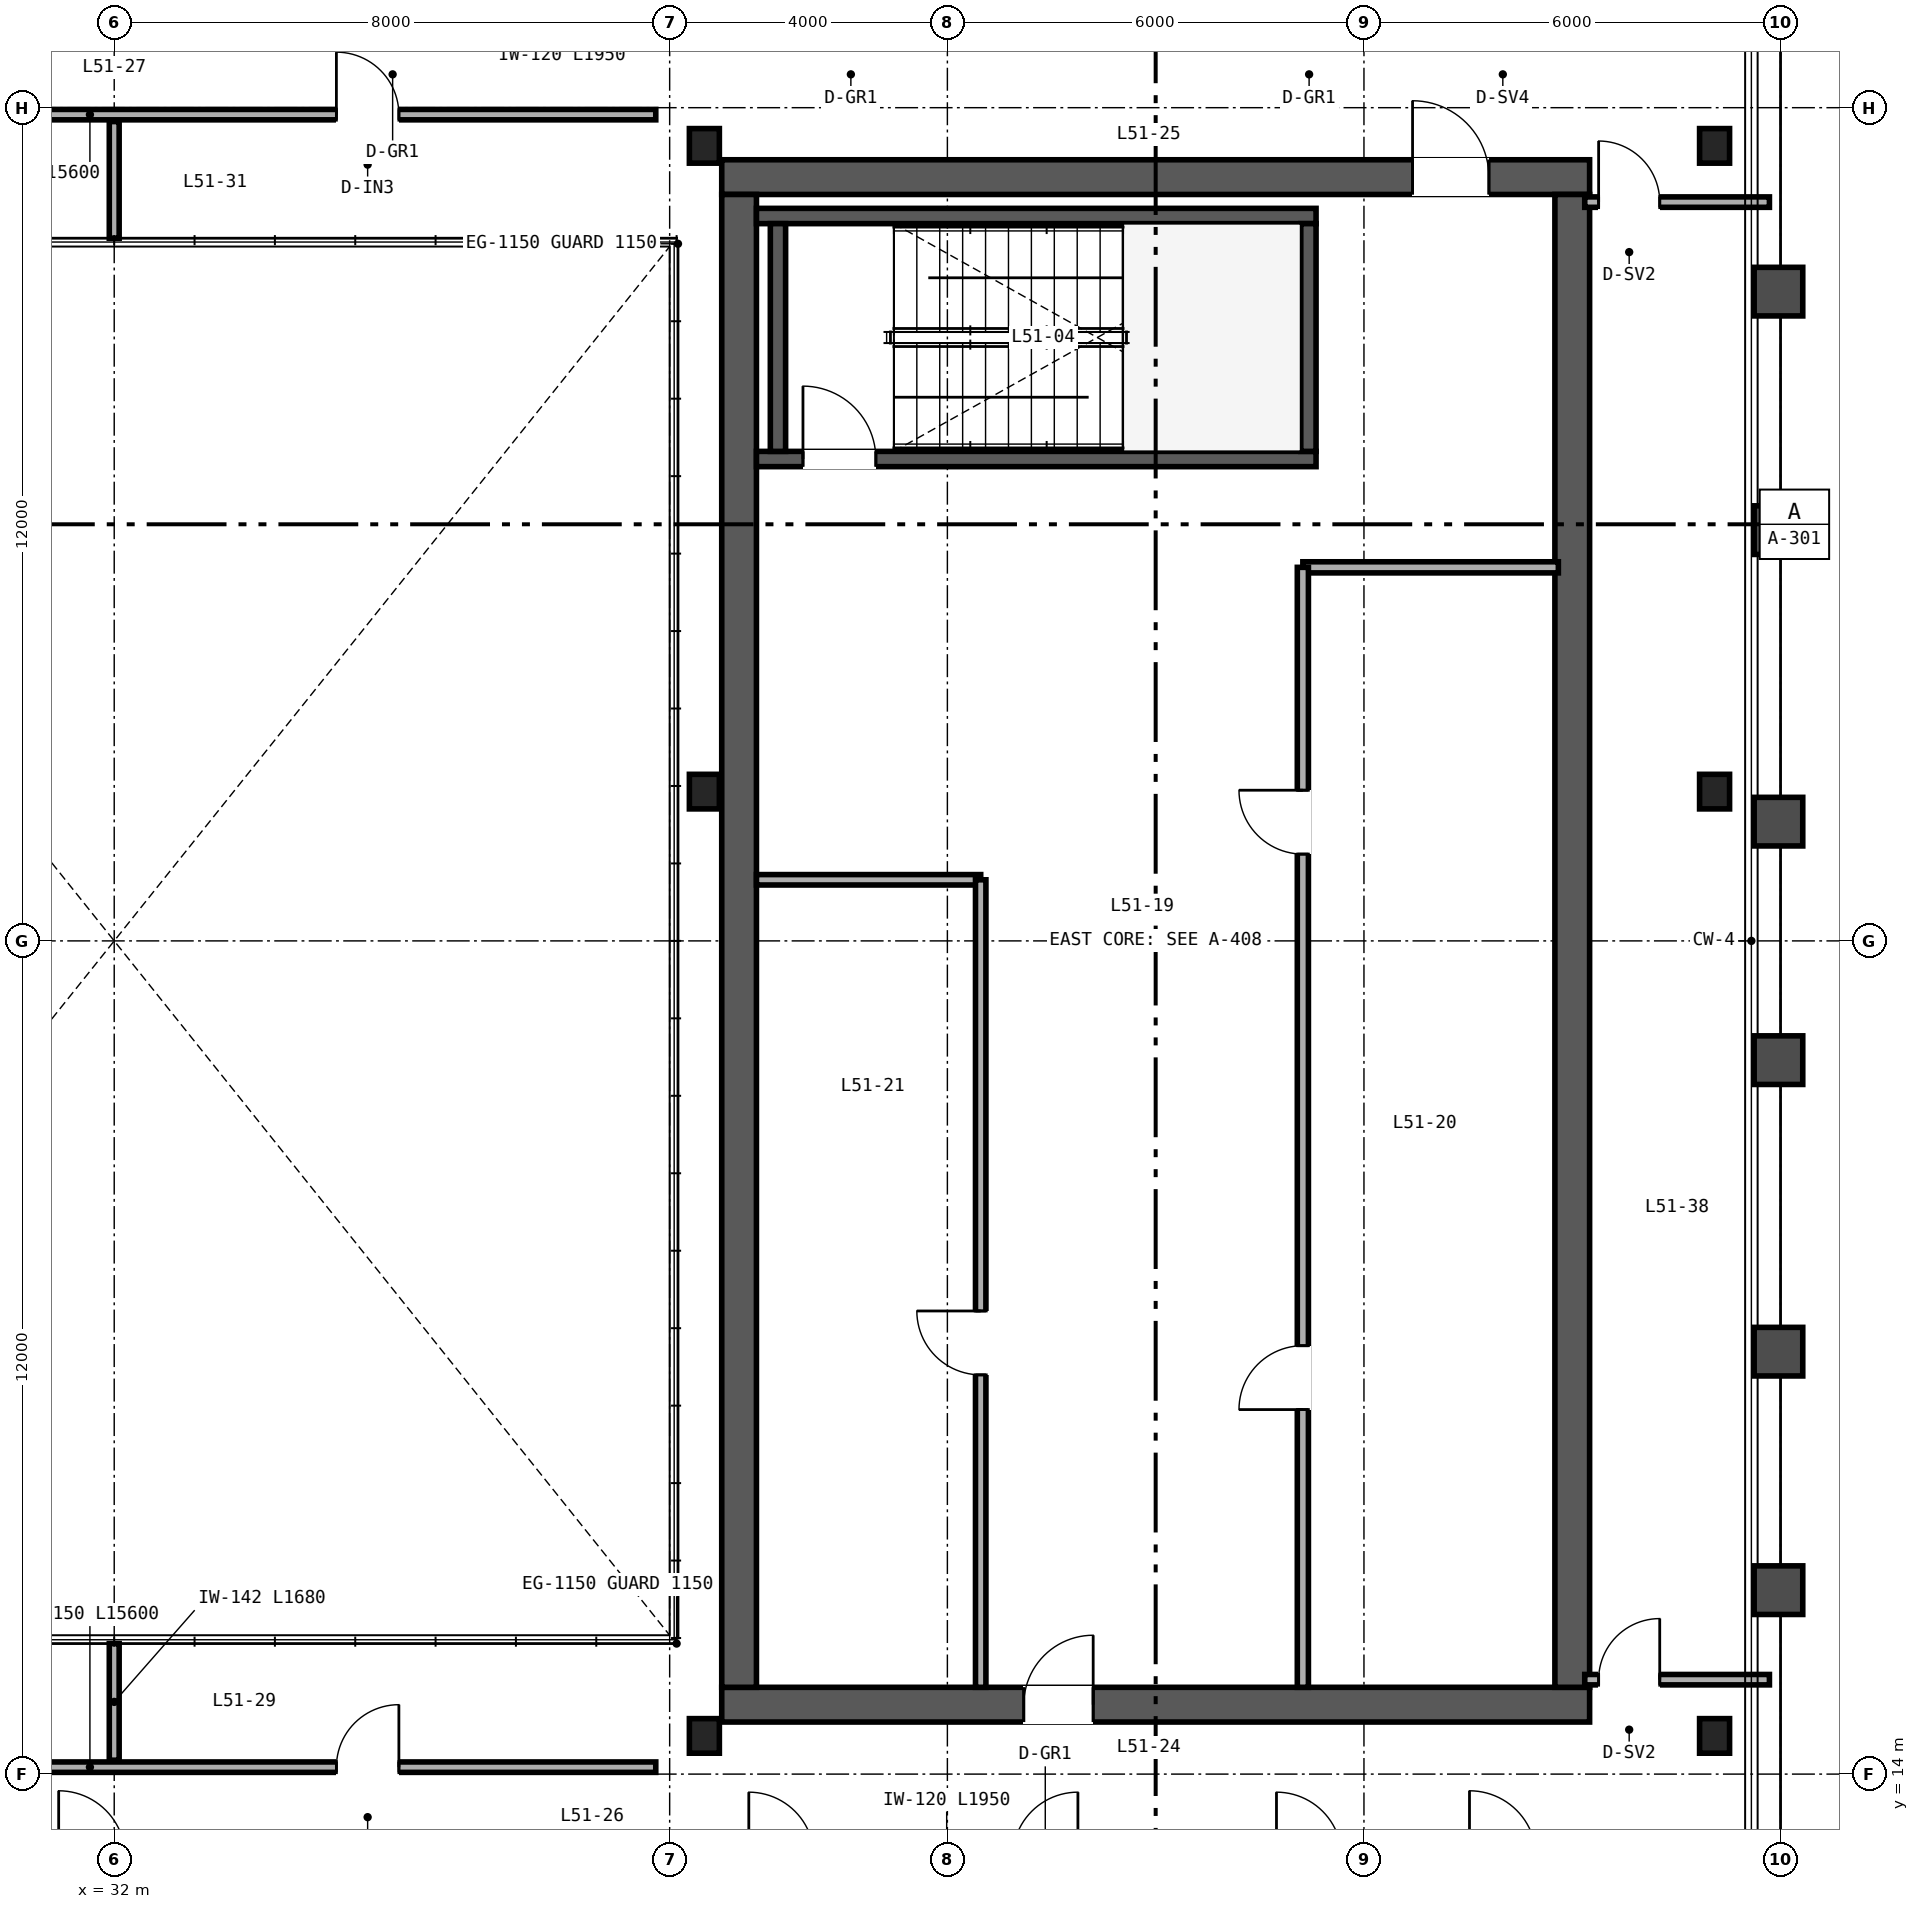
"""IFC4 building model, lengths in metres.
Left out: names, types, materials, properties, quantities, classifications, styles, units other than length and angle.
Written with IfcOpenShell. Run it as: python <this file> out.ifc"""

import sys

from ifc_helpers import new_model, si_unit, direction, frame, frame_2d, origin, origin_2d, place, context, subcontext, project, spatial, rectangle, i_section, extrude, source, transform, mapped, element, fill, save


model = new_model("IFC4")
c1 = context("Model", 3, precision=1e-05, world=origin(), true_north=direction((0.0, 1.0)))
c2 = subcontext(c1, "Body", "Model", "MODEL_VIEW")
j1 = project(units=[si_unit("LENGTHUNIT", "METRE"), si_unit("PLANEANGLEUNIT", "RADIAN")], contexts=[c1])
p1 = place(None, origin())
s1 = spatial("IfcSite", under=j1, at=p1, CompositionType="ELEMENT")
p2 = place(p1, origin())
s2 = spatial("IfcBuilding", under=s1, at=p2, CompositionType="ELEMENT")
p3 = place(p2, frame((0.0, 0.0, 202.8)))
s3 = spatial("IfcBuildingStorey", under=s2, at=p3, CompositionType="ELEMENT", Elevation=202.8)
p4 = place(p3, frame((40.75, 15.0, 0.0), z_axis=(0.0, 0.0, 1.0), x_axis=(1.0, 0.0, 0.0)))
e1 = element("IfcWall", 1, at=p4, inside=s3, PredefinedType="SHEAR", context=c2, shape_type="SweptSolid", body=[
    extrude(rectangle(XDim=12.5, YDim=0.5, at=frame_2d((6.25, 0.0))), origin(), (0.0, 0.0, 1.0), 3.37),
])
p5 = place(p4, frame((4.35, 0.0, 0.0)))
e2 = element("IfcOpeningElement", 2, at=p5, cuts=e1, PredefinedType="OPENING", context=c2, shape_type="SweptSolid", body=[
    extrude(rectangle(XDim=1.0, YDim=2.15, at=frame_2d((0.5, 1.075))), frame((0.0, 0.26, 0.0), z_axis=(0.0, -1.0, 0.0), x_axis=(1.0, 0.0, 0.0)), (0.0, 0.0, 1.0), 0.52),
])
p6 = place(p3, frame((40.75, 37.0, 0.0), z_axis=(0.0, 0.0, 1.0), x_axis=(1.0, 0.0, 0.0)))
e3 = element("IfcWall", 3, at=p6, inside=s3, PredefinedType="SHEAR", context=c2, shape_type="SweptSolid", body=[
    extrude(rectangle(XDim=12.5, YDim=0.5, at=frame_2d((6.25, 0.0))), origin(), (0.0, 0.0, 1.0), 3.37),
])
p7 = place(p6, frame((9.95, 0.0, 0.0)))
e4 = element("IfcOpeningElement", 4, at=p7, cuts=e3, PredefinedType="OPENING", context=c2, shape_type="SweptSolid", body=[
    extrude(rectangle(XDim=1.1, YDim=2.15, at=frame_2d((0.55, 1.075))), frame((0.0, 0.26, 0.0), z_axis=(0.0, -1.0, 0.0), x_axis=(1.0, 0.0, 0.0)), (0.0, 0.0, 1.0), 0.52),
])
for number, where, z_axis, x_axis in (
    (5, (41.0, 15.25, 0.0), (0.0, 0.0, 1.0), (0.0, 1.0, 0.0)),
    (6, (53.0, 15.25, 0.0), (0.0, 0.0, 1.0), (0.0, 1.0, 0.0)),
):
    element("IfcWall", number, at=place(p3, frame(where, z_axis=z_axis, x_axis=x_axis)), inside=s3, PredefinedType="SHEAR", context=c2, shape_type="SweptSolid", body=[
        extrude(rectangle(XDim=21.5, YDim=0.5, at=frame_2d((10.75, 0.0))), origin(), (0.0, 0.0, 1.0), 3.37),
    ])
p8 = place(p3, frame((41.25, 32.94, 0.0), z_axis=(0.0, 0.0, 1.0), x_axis=(1.0, 0.0, 0.0)))
e7 = element("IfcWall", 7, at=p8, inside=s3, PredefinedType="SHEAR", context=c2, shape_type="SweptSolid", body=[
    extrude(rectangle(XDim=8.06, YDim=0.22, at=frame_2d((4.03, 0.0))), origin(), (0.0, 0.0, 1.0), 3.4),
])
p9 = place(p8, frame((0.67, 0.0, 0.0)))
e8 = element("IfcOpeningElement", 8, at=p9, cuts=e7, PredefinedType="OPENING", context=c2, shape_type="SweptSolid", body=[
    extrude(rectangle(XDim=1.05, YDim=2.15, at=frame_2d((0.525, 1.075))), frame((0.0, 0.12, 0.0), z_axis=(0.0, -1.0, 0.0), x_axis=(1.0, 0.0, 0.0)), (0.0, 0.0, 1.0), 0.24),
])
p10 = place(p3, frame((41.25, 36.44, 0.0), z_axis=(0.0, 0.0, 1.0), x_axis=(1.0, 0.0, 0.0)))
e9 = element("IfcWall", 9, at=p10, inside=s3, PredefinedType="SHEAR", context=c2, shape_type="SweptSolid", body=[
    extrude(rectangle(XDim=8.06, YDim=0.22, at=frame_2d((4.03, 0.0))), origin(), (0.0, 0.0, 1.0), 3.4),
])
for number, where, z_axis, x_axis in (
    (10, (41.56, 33.05, 0.0), (0.0, 0.0, 1.0), (0.0, 1.0, 0.0)),
    (11, (49.2, 33.05, 0.0), (0.0, 0.0, 1.0), (0.0, 1.0, 0.0)),
):
    element("IfcWall", number, at=place(p3, frame(where, z_axis=z_axis, x_axis=x_axis)), inside=s3, PredefinedType="SHEAR", context=c2, shape_type="SweptSolid", body=[
        extrude(rectangle(XDim=3.28, YDim=0.22, at=frame_2d((1.64, 0.0))), origin(), (0.0, 0.0, 1.0), 3.4),
    ])
m1 = source(origin(), c2, "Body", "SweptSolid", [
    extrude(i_section(OverallWidth=0.432, OverallDepth=0.498, WebThickness=0.056, FlangeThickness=0.089, FilletRadius=0.025, at=origin_2d()), origin(), (0.0, 0.0, 1.0), 3.37),
])
for number, where, z_axis, x_axis in (
    (12, (40.5, 14.55, 0.0), (0.0, 0.0, 1.0), (1.0, 0.0, 0.0)),
    (13, (55.05, 14.55, 0.0), (0.0, 0.0, 1.0), (1.0, 0.0, 0.0)),
    (14, (40.5, 28.15, 0.0), (0.0, 0.0, 1.0), (1.0, 0.0, 0.0)),
    (15, (55.05, 28.15, 0.0), (0.0, 0.0, 1.0), (1.0, 0.0, 0.0)),
    (16, (40.5, 37.45, 0.0), (0.0, 0.0, 1.0), (1.0, 0.0, 0.0)),
    (17, (55.05, 37.45, 0.0), (0.0, 0.0, 1.0), (1.0, 0.0, 0.0)),
):
    element("IfcColumn", number, at=place(p3, frame(where, z_axis=z_axis, x_axis=x_axis)), inside=s3, PredefinedType="COLUMN", context=c2, shape_type="MappedRepresentation", body=[
        mapped(m1, transform((0.0, 0.0, 0.0), scale=1.0)),
    ])
p11 = place(p3, frame((49.12, 31.38, 0.0), z_axis=(0.0, 0.0, 1.0), x_axis=(1.0, 0.0, 0.0)))
e18 = element("IfcWall", 18, at=p11, inside=s3, PredefinedType="PARTITIONING", context=c2, shape_type="SweptSolid", body=[
    extrude(rectangle(XDim=3.68, YDim=0.16, at=frame_2d((1.84, 0.0))), origin(), (0.0, 0.0, 1.0), 2.47),
])
p12 = place(p3, frame((49.12, 15.25, 0.0), z_axis=(0.0, 0.0, 1.0), x_axis=(0.0, 1.0, 0.0)))
e19 = element("IfcWall", 19, at=p12, inside=s3, PredefinedType="PARTITIONING", context=c2, shape_type="SweptSolid", body=[
    extrude(rectangle(XDim=16.13, YDim=0.16, at=frame_2d((8.065, 0.0))), origin(), (0.0, 0.0, 1.0), 2.443),
])
p13 = place(p12, frame((4.0, 0.0, 0.0)))
e20 = element("IfcOpeningElement", 20, at=p13, cuts=e19, PredefinedType="OPENING", context=c2, shape_type="SweptSolid", body=[
    extrude(rectangle(XDim=0.92, YDim=2.15, at=frame_2d((0.46, 1.075))), frame((0.0, 0.09, 0.0), z_axis=(0.0, -1.0, 0.0), x_axis=(1.0, 0.0, 0.0)), (0.0, 0.0, 1.0), 0.18),
])
p14 = place(p12, frame((12.0, 0.0, 0.0)))
e21 = element("IfcOpeningElement", 21, at=p14, cuts=e19, PredefinedType="OPENING", context=c2, shape_type="SweptSolid", body=[
    extrude(rectangle(XDim=0.92, YDim=2.15, at=frame_2d((0.46, 1.075))), frame((0.0, 0.09, 0.0), z_axis=(0.0, -1.0, 0.0), x_axis=(1.0, 0.0, 0.0)), (0.0, 0.0, 1.0), 0.18),
])
p15 = place(p3, frame((41.25, 26.88, 0.0), z_axis=(0.0, 0.0, 1.0), x_axis=(1.0, 0.0, 0.0)))
e22 = element("IfcWall", 22, at=p15, inside=s3, PredefinedType="PARTITIONING", context=c2, shape_type="SweptSolid", body=[
    extrude(rectangle(XDim=3.23, YDim=0.15, at=frame_2d((1.615, 0.0))), origin(), (0.0, 0.0, 1.0), 3.37),
])
p16 = place(p3, frame((44.48, 15.25, 0.0), z_axis=(0.0, 0.0, 1.0), x_axis=(0.0, 1.0, 0.0)))
e23 = element("IfcWall", 23, at=p16, inside=s3, PredefinedType="PARTITIONING", context=c2, shape_type="SweptSolid", body=[
    extrude(rectangle(XDim=11.63, YDim=0.15, at=frame_2d((5.815, 0.0))), origin(), (0.0, 0.0, 1.0), 3.37),
])
p17 = place(p16, frame((4.5, 0.0, 0.0)))
e24 = element("IfcOpeningElement", 24, at=p17, cuts=e23, PredefinedType="OPENING", context=c2, shape_type="SweptSolid", body=[
    extrude(rectangle(XDim=0.92, YDim=2.15, at=frame_2d((0.46, 1.075))), frame((0.0, 0.085, 0.0), z_axis=(0.0, -1.0, 0.0), x_axis=(1.0, 0.0, 0.0)), (0.0, 0.0, 1.0), 0.17),
])
p18 = place(p3, frame((24.2, 14.1, 0.0), z_axis=(0.0, 0.0, 1.0), x_axis=(1.0, 0.0, 0.0)))
e25 = element("IfcWall", 25, at=p18, inside=s3, PredefinedType="PARTITIONING", context=c2, shape_type="SweptSolid", body=[
    extrude(rectangle(XDim=15.6, YDim=0.15, at=frame_2d((7.8, 0.0))), origin(), (0.0, 0.0, 1.0), 3.37),
])
p19 = place(p18, frame((3.0, 0.0, 0.0)))
e26 = element("IfcOpeningElement", 26, at=p19, cuts=e25, PredefinedType="OPENING", context=c2, shape_type="SweptSolid", body=[
    extrude(rectangle(XDim=0.9, YDim=2.15, at=frame_2d((0.45, 1.075))), frame((0.0, 0.085, 0.0), z_axis=(0.0, -1.0, 0.0), x_axis=(1.0, 0.0, 0.0)), (0.0, 0.0, 1.0), 0.17),
])
p20 = place(p18, frame((11.0, 0.0, 0.0)))
e27 = element("IfcOpeningElement", 27, at=p20, cuts=e25, PredefinedType="OPENING", context=c2, shape_type="SweptSolid", body=[
    extrude(rectangle(XDim=0.9, YDim=2.15, at=frame_2d((0.45, 1.075))), frame((0.0, 0.085, 0.0), z_axis=(0.0, -1.0, 0.0), x_axis=(1.0, 0.0, 0.0)), (0.0, 0.0, 1.0), 0.17),
])
p21 = place(p3, frame((24.2, 37.9, 0.0), z_axis=(0.0, 0.0, 1.0), x_axis=(1.0, 0.0, 0.0)))
e28 = element("IfcWall", 28, at=p21, inside=s3, PredefinedType="PARTITIONING", context=c2, shape_type="SweptSolid", body=[
    extrude(rectangle(XDim=15.6, YDim=0.15, at=frame_2d((7.8, 0.0))), origin(), (0.0, 0.0, 1.0), 3.37),
])
p22 = place(p21, frame((3.0, 0.0, 0.0)))
e29 = element("IfcOpeningElement", 29, at=p22, cuts=e28, PredefinedType="OPENING", context=c2, shape_type="SweptSolid", body=[
    extrude(rectangle(XDim=0.9, YDim=2.15, at=frame_2d((0.45, 1.075))), frame((0.0, 0.085, 0.0), z_axis=(0.0, -1.0, 0.0), x_axis=(1.0, 0.0, 0.0)), (0.0, 0.0, 1.0), 0.17),
])
p23 = place(p21, frame((11.0, 0.0, 0.0)))
e30 = element("IfcOpeningElement", 30, at=p23, cuts=e28, PredefinedType="OPENING", context=c2, shape_type="SweptSolid", body=[
    extrude(rectangle(XDim=0.9, YDim=2.15, at=frame_2d((0.45, 1.075))), frame((0.0, 0.085, 0.0), z_axis=(0.0, -1.0, 0.0), x_axis=(1.0, 0.0, 0.0)), (0.0, 0.0, 1.0), 0.17),
])
for number, where, z_axis, x_axis in (
    (31, (32.0, 14.2, 0.0), (0.0, 0.0, 1.0), (0.0, 1.0, 0.0)),
    (32, (32.0, 36.12, 0.0), (0.0, 0.0, 1.0), (0.0, 1.0, 0.0)),
):
    element("IfcWall", number, at=place(p3, frame(where, z_axis=z_axis, x_axis=x_axis)), inside=s3, PredefinedType="PARTITIONING", context=c2, shape_type="SweptSolid", body=[
        extrude(rectangle(XDim=1.68, YDim=0.142, at=frame_2d((0.84, 0.0))), origin(), (0.0, 0.0, 1.0), 3.37),
    ])
p24 = place(p3, frame((53.18, 15.36, 0.0), z_axis=(0.0, 0.0, 1.0), x_axis=(1.0, 0.0, 0.0)))
e33 = element("IfcWall", 33, at=p24, inside=s3, PredefinedType="PARTITIONING", context=c2, shape_type="SweptSolid", body=[
    extrude(rectangle(XDim=2.66, YDim=0.15, at=frame_2d((1.33, 0.0))), origin(), (0.0, 0.0, 1.0), 2.591),
])
p25 = place(p24, frame((0.2, 0.0, 0.0)))
e34 = element("IfcOpeningElement", 34, at=p25, cuts=e33, PredefinedType="OPENING", context=c2, shape_type="SweptSolid", body=[
    extrude(rectangle(XDim=0.88, YDim=2.15, at=frame_2d((0.44, 1.075))), frame((0.0, 0.085, 0.0), z_axis=(0.0, -1.0, 0.0), x_axis=(1.0, 0.0, 0.0)), (0.0, 0.0, 1.0), 0.17),
])
p26 = place(p3, frame((53.18, 36.64, 0.0), z_axis=(0.0, 0.0, 1.0), x_axis=(1.0, 0.0, 0.0)))
e35 = element("IfcWall", 35, at=p26, inside=s3, PredefinedType="PARTITIONING", context=c2, shape_type="SweptSolid", body=[
    extrude(rectangle(XDim=2.66, YDim=0.15, at=frame_2d((1.33, 0.0))), origin(), (0.0, 0.0, 1.0), 2.753),
])
p27 = place(p26, frame((0.2, 0.0, 0.0)))
e36 = element("IfcOpeningElement", 36, at=p27, cuts=e35, PredefinedType="OPENING", context=c2, shape_type="SweptSolid", body=[
    extrude(rectangle(XDim=0.88, YDim=2.15, at=frame_2d((0.44, 1.075))), frame((0.0, 0.085, 0.0), z_axis=(0.0, -1.0, 0.0), x_axis=(1.0, 0.0, 0.0)), (0.0, 0.0, 1.0), 0.17),
])
m2 = source(origin(), c2, "Body", "SweptSolid", [
    extrude(rectangle(XDim=1.05, YDim=2.15, at=frame_2d((0.525, 1.075))), frame((0.0, 0.025, 0.0), z_axis=(0.0, -1.0, 0.0), x_axis=(1.0, 0.0, 0.0)), (0.0, 0.0, 1.0), 0.05),
])
p28 = place(p9, origin())
e37 = element("IfcDoor", 37, at=p28, inside=s3, OperationType="SINGLE_SWING_LEFT", PredefinedType="DOOR", context=c2, shape_type="MappedRepresentation", body=[
    mapped(m2, transform((0.0, 0.0, 0.0), scale=1.0)),
])
fill(e8, e37)
m3 = source(origin(), c2, "Body", "SweptSolid", [
    extrude(rectangle(XDim=1.0, YDim=2.15, at=frame_2d((0.5, 1.075))), frame((0.0, 0.025, 0.0), z_axis=(0.0, -1.0, 0.0), x_axis=(1.0, 0.0, 0.0)), (0.0, 0.0, 1.0), 0.05),
])
p29 = place(p5, origin())
e38 = element("IfcDoor", 38, at=p29, inside=s3, OperationType="SINGLE_SWING_RIGHT", PredefinedType="DOOR", context=c2, shape_type="MappedRepresentation", body=[
    mapped(m3, transform((0.0, 0.0, 0.0), scale=1.0)),
])
fill(e2, e38)
m4 = source(origin(), c2, "Body", "SweptSolid", [
    extrude(rectangle(XDim=1.1, YDim=2.15, at=frame_2d((0.55, 1.075))), frame((0.0, 0.025, 0.0), z_axis=(0.0, -1.0, 0.0), x_axis=(1.0, 0.0, 0.0)), (0.0, 0.0, 1.0), 0.05),
])
p30 = place(p7, origin())
e39 = element("IfcDoor", 39, at=p30, inside=s3, OperationType="SINGLE_SWING_LEFT", PredefinedType="DOOR", context=c2, shape_type="MappedRepresentation", body=[
    mapped(m4, transform((0.0, 0.0, 0.0), scale=1.0)),
])
fill(e4, e39)
m5 = source(origin(), c2, "Body", "SweptSolid", [
    extrude(rectangle(XDim=0.92, YDim=2.15, at=frame_2d((0.46, 1.075))), frame((0.0, 0.025, 0.0), z_axis=(0.0, -1.0, 0.0), x_axis=(1.0, 0.0, 0.0)), (0.0, 0.0, 1.0), 0.05),
])
p31 = place(p13, origin())
e40 = element("IfcDoor", 40, at=p31, inside=s3, OperationType="SINGLE_SWING_LEFT", PredefinedType="DOOR", context=c2, shape_type="MappedRepresentation", body=[
    mapped(m5, transform((0.0, 0.0, 0.0), scale=1.0)),
])
fill(e20, e40)
p32 = place(p14, origin())
e41 = element("IfcDoor", 41, at=p32, inside=s3, OperationType="SINGLE_SWING_RIGHT", PredefinedType="DOOR", context=c2, shape_type="MappedRepresentation", body=[
    mapped(m5, transform((0.0, 0.0, 0.0), scale=1.0)),
])
fill(e21, e41)
p33 = place(p17, origin())
e42 = element("IfcDoor", 42, at=p33, inside=s3, OperationType="SINGLE_SWING_RIGHT", PredefinedType="DOOR", context=c2, shape_type="MappedRepresentation", body=[
    mapped(m5, transform((0.0, 0.0, 0.0), scale=1.0)),
])
fill(e24, e42)
m6 = source(origin(), c2, "Body", "SweptSolid", [
    extrude(rectangle(XDim=0.9, YDim=2.15, at=frame_2d((0.45, 1.075))), frame((0.0, 0.025, 0.0), z_axis=(0.0, -1.0, 0.0), x_axis=(1.0, 0.0, 0.0)), (0.0, 0.0, 1.0), 0.05),
])
p34 = place(p20, origin())
e43 = element("IfcDoor", 43, at=p34, inside=s3, OperationType="SINGLE_SWING_RIGHT", PredefinedType="DOOR", context=c2, shape_type="MappedRepresentation", body=[
    mapped(m6, transform((0.0, 0.0, 0.0), scale=1.0)),
])
fill(e27, e43)
p35 = place(p23, origin())
e44 = element("IfcDoor", 44, at=p35, inside=s3, OperationType="SINGLE_SWING_LEFT", PredefinedType="DOOR", context=c2, shape_type="MappedRepresentation", body=[
    mapped(m6, transform((0.0, 0.0, 0.0), scale=1.0)),
])
fill(e30, e44)
m7 = source(origin(), c2, "Body", "SweptSolid", [
    extrude(rectangle(XDim=0.88, YDim=2.15, at=frame_2d((0.44, 1.075))), frame((0.0, 0.025, 0.0), z_axis=(0.0, -1.0, 0.0), x_axis=(1.0, 0.0, 0.0)), (0.0, 0.0, 1.0), 0.05),
])
p36 = place(p25, origin())
e45 = element("IfcDoor", 45, at=p36, inside=s3, OperationType="SINGLE_SWING_RIGHT", PredefinedType="DOOR", context=c2, shape_type="MappedRepresentation", body=[
    mapped(m7, transform((0.0, 0.0, 0.0), scale=1.0)),
])
fill(e34, e45)
p37 = place(p27, origin())
e46 = element("IfcDoor", 46, at=p37, inside=s3, OperationType="SINGLE_SWING_LEFT", PredefinedType="DOOR", context=c2, shape_type="MappedRepresentation", body=[
    mapped(m7, transform((0.0, 0.0, 0.0), scale=1.0)),
])
fill(e36, e46)
save(model, sys.argv[1])
